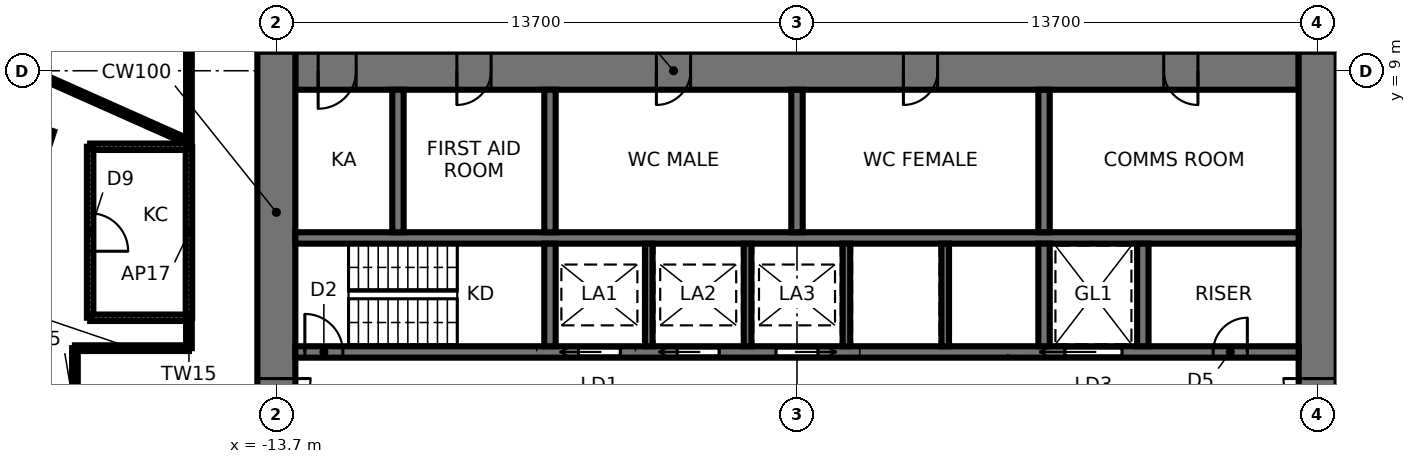
"""IFC4 building model, lengths in metres.
Left out: names, types, materials, properties, quantities, classifications, styles, units other than length and angle.
Written with IfcOpenShell. Run it as: python <this file> out.ifc"""

import sys

from ifc_helpers import new_model, si_unit, direction, frame, frame_2d, origin, origin_2d, place, context, subcontext, project, spatial, rectangle, extrude, element, fill, save


model = new_model("IFC4")
c1 = context("Model", 3, precision=1e-05, world=origin(), true_north=direction((0.0, 1.0)))
c2 = subcontext(c1, "Body", "Model", "MODEL_VIEW")
j1 = project(units=[si_unit("LENGTHUNIT", "METRE"), si_unit("PLANEANGLEUNIT", "RADIAN")], contexts=[c1])
p1 = place(None, origin())
s1 = spatial("IfcSite", under=j1, at=p1, CompositionType="ELEMENT")
p2 = place(p1, origin())
s2 = spatial("IfcBuilding", under=s1, at=p2, CompositionType="ELEMENT")
p3 = place(p2, frame((0.0, 0.0, 32.2)))
s3 = spatial("IfcBuildingStorey", under=s2, at=p3, CompositionType="ELEMENT", Elevation=32.2)
p4 = place(p3, frame((-20.808, 6.761, 0.0), z_axis=(0.0, 0.0, 1.0), x_axis=(-0.951056516295, 0.309016994375, 0.0)))
e1 = element("IfcColumn", 1, at=p4, inside=s3, PredefinedType="COLUMN", context=c2, shape_type="SweptSolid", body=[
    extrude(rectangle(XDim=2.0, YDim=2.0, at=origin_2d()), origin(), (0.0, 0.0, 1.0), 4.2),
])
p5 = place(p3, frame((13.2, 9.0, 0.0), z_axis=(0.0, 0.0, 1.0), x_axis=(-1.0, 0.0, 0.0)))
e2 = element("IfcWall", 2, at=p5, inside=s3, PredefinedType="SHEAR", context=c2, shape_type="SweptSolid", body=[
    extrude(rectangle(XDim=26.4, YDim=1.0, at=frame_2d((13.2, 0.0))), origin(), (0.0, 0.0, 1.0), 4.2),
])
p6 = place(p5, frame((2.65, 0.0, 0.0)))
e3 = element("IfcOpeningElement", 3, at=p6, cuts=e2, PredefinedType="OPENING", context=c2, shape_type="SweptSolid", body=[
    extrude(rectangle(XDim=0.9, YDim=2.1, at=frame_2d((0.45, 1.05))), frame((0.0, 0.51, 0.0), z_axis=(0.0, -1.0, 0.0), x_axis=(1.0, 0.0, 0.0)), (0.0, 0.0, 1.0), 1.02),
])
p7 = place(p5, frame((9.5, 0.0, 0.0)))
e4 = element("IfcOpeningElement", 4, at=p7, cuts=e2, PredefinedType="OPENING", context=c2, shape_type="SweptSolid", body=[
    extrude(rectangle(XDim=0.9, YDim=2.1, at=frame_2d((0.45, 1.05))), frame((0.0, 0.51, 0.0), z_axis=(0.0, -1.0, 0.0), x_axis=(1.0, 0.0, 0.0)), (0.0, 0.0, 1.0), 1.02),
])
p8 = place(p5, frame((16.0, 0.0, 0.0)))
e5 = element("IfcOpeningElement", 5, at=p8, cuts=e2, PredefinedType="OPENING", context=c2, shape_type="SweptSolid", body=[
    extrude(rectangle(XDim=0.9, YDim=2.1, at=frame_2d((0.45, 1.05))), frame((0.0, 0.51, 0.0), z_axis=(0.0, -1.0, 0.0), x_axis=(1.0, 0.0, 0.0)), (0.0, 0.0, 1.0), 1.02),
])
p9 = place(p5, frame((21.25, 0.0, 0.0)))
e6 = element("IfcOpeningElement", 6, at=p9, cuts=e2, PredefinedType="OPENING", context=c2, shape_type="SweptSolid", body=[
    extrude(rectangle(XDim=0.9, YDim=2.1, at=frame_2d((0.45, 1.05))), frame((0.0, 0.51, 0.0), z_axis=(0.0, -1.0, 0.0), x_axis=(1.0, 0.0, 0.0)), (0.0, 0.0, 1.0), 1.02),
])
p10 = place(p5, frame((24.8, 0.0, 0.0)))
e7 = element("IfcOpeningElement", 7, at=p10, cuts=e2, PredefinedType="OPENING", context=c2, shape_type="SweptSolid", body=[
    extrude(rectangle(XDim=1.0, YDim=2.1, at=frame_2d((0.5, 1.05))), frame((0.0, 0.51, 0.0), z_axis=(0.0, -1.0, 0.0), x_axis=(1.0, 0.0, 0.0)), (0.0, 0.0, 1.0), 1.02),
])
p11 = place(p3, frame((13.7, -9.5, 0.0), z_axis=(0.0, 0.0, 1.0), x_axis=(0.0, 1.0, 0.0)))
e8 = element("IfcWall", 8, at=p11, inside=s3, PredefinedType="SHEAR", context=c2, shape_type="SweptSolid", body=[
    extrude(rectangle(XDim=19.0, YDim=1.0, at=frame_2d((9.5, 0.0))), origin(), (0.0, 0.0, 1.0), 4.2),
])
p12 = place(p11, frame((8.6, 0.0, 0.0)))
e9 = element("IfcOpeningElement", 9, at=p12, cuts=e8, PredefinedType="OPENING", context=c2, shape_type="SweptSolid", body=[
    extrude(rectangle(XDim=1.8, YDim=2.4, at=frame_2d((0.9, 1.2))), frame((0.0, 0.51, 0.0), z_axis=(0.0, -1.0, 0.0), x_axis=(1.0, 0.0, 0.0)), (0.0, 0.0, 1.0), 1.02),
])
p13 = place(p3, frame((-13.7, 9.5, 0.0), z_axis=(0.0, 0.0, 1.0), x_axis=(0.0, -1.0, 0.0)))
e10 = element("IfcWall", 10, at=p13, inside=s3, PredefinedType="SHEAR", context=c2, shape_type="SweptSolid", body=[
    extrude(rectangle(XDim=19.0, YDim=1.0, at=frame_2d((9.5, 0.0))), origin(), (0.0, 0.0, 1.0), 4.2),
])
p14 = place(p13, frame((8.6, 0.0, 0.0)))
e11 = element("IfcOpeningElement", 11, at=p14, cuts=e10, PredefinedType="OPENING", context=c2, shape_type="SweptSolid", body=[
    extrude(rectangle(XDim=1.8, YDim=2.4, at=frame_2d((0.9, 1.2))), frame((0.0, 0.51, 0.0), z_axis=(0.0, -1.0, 0.0), x_axis=(1.0, 0.0, 0.0)), (0.0, 0.0, 1.0), 1.02),
])
p15 = place(p3, frame((-13.2, 1.6, 0.0), z_axis=(0.0, 0.0, 1.0), x_axis=(1.0, 0.0, 0.0)))
e12 = element("IfcWall", 12, at=p15, inside=s3, PredefinedType="SHEAR", context=c2, shape_type="SweptSolid", body=[
    extrude(rectangle(XDim=26.4, YDim=0.3, at=frame_2d((13.2, 0.0))), origin(), (0.0, 0.0, 1.0), 4.2),
])
p16 = place(p15, frame((0.25, 0.0, 0.0)))
e13 = element("IfcOpeningElement", 13, at=p16, cuts=e12, PredefinedType="OPENING", context=c2, shape_type="SweptSolid", body=[
    extrude(rectangle(XDim=1.0, YDim=2.1, at=frame_2d((0.5, 1.05))), frame((0.0, 0.16, 0.0), z_axis=(0.0, -1.0, 0.0), x_axis=(1.0, 0.0, 0.0)), (0.0, 0.0, 1.0), 0.32),
])
p17 = place(p15, frame((20.25, 0.0, 0.0)))
e14 = element("IfcOpeningElement", 14, at=p17, cuts=e12, PredefinedType="OPENING", context=c2, shape_type="SweptSolid", body=[
    extrude(rectangle(XDim=1.5, YDim=2.4, at=frame_2d((0.75, 1.2))), frame((0.0, 0.16, 0.0), z_axis=(0.0, -1.0, 0.0), x_axis=(1.0, 0.0, 0.0)), (0.0, 0.0, 1.0), 0.32),
])
p18 = place(p15, frame((7.45, 0.0, 0.0)))
e15 = element("IfcOpeningElement", 15, at=p18, cuts=e12, PredefinedType="OPENING", context=c2, shape_type="SweptSolid", body=[
    extrude(rectangle(XDim=1.1, YDim=2.3, at=frame_2d((0.55, 1.15))), frame((0.0, 0.16, 0.0), z_axis=(0.0, -1.0, 0.0), x_axis=(1.0, 0.0, 0.0)), (0.0, 0.0, 1.0), 0.32),
])
p19 = place(p15, frame((10.05, 0.0, 0.0)))
e16 = element("IfcOpeningElement", 16, at=p19, cuts=e12, PredefinedType="OPENING", context=c2, shape_type="SweptSolid", body=[
    extrude(rectangle(XDim=1.1, YDim=2.3, at=frame_2d((0.55, 1.15))), frame((0.0, 0.16, 0.0), z_axis=(0.0, -1.0, 0.0), x_axis=(1.0, 0.0, 0.0)), (0.0, 0.0, 1.0), 0.32),
])
p20 = place(p15, frame((12.65, 0.0, 0.0)))
e17 = element("IfcOpeningElement", 17, at=p20, cuts=e12, PredefinedType="OPENING", context=c2, shape_type="SweptSolid", body=[
    extrude(rectangle(XDim=1.1, YDim=2.3, at=frame_2d((0.55, 1.15))), frame((0.0, 0.16, 0.0), z_axis=(0.0, -1.0, 0.0), x_axis=(1.0, 0.0, 0.0)), (0.0, 0.0, 1.0), 0.32),
])
p21 = place(p15, frame((24.15, 0.0, 0.0)))
e18 = element("IfcOpeningElement", 18, at=p21, cuts=e12, PredefinedType="OPENING", context=c2, shape_type="SweptSolid", body=[
    extrude(rectangle(XDim=0.9, YDim=2.1, at=frame_2d((0.45, 1.05))), frame((0.0, 0.16, 0.0), z_axis=(0.0, -1.0, 0.0), x_axis=(1.0, 0.0, 0.0)), (0.0, 0.0, 1.0), 0.32),
])
p22 = place(p3, frame((-13.2, 4.6, 0.0), z_axis=(0.0, 0.0, 1.0), x_axis=(1.0, 0.0, 0.0)))
e19 = element("IfcWall", 19, at=p22, inside=s3, PredefinedType="SHEAR", context=c2, shape_type="SweptSolid", body=[
    extrude(rectangle(XDim=26.4, YDim=0.3, at=frame_2d((13.2, 0.0))), origin(), (0.0, 0.0, 1.0), 4.2),
])
p23 = place(p3, frame((-6.5, 1.75, 0.0), z_axis=(0.0, 0.0, 1.0), x_axis=(0.0, 1.0, 0.0)))
e20 = element("IfcWall", 20, at=p23, inside=s3, PredefinedType="SHEAR", context=c2, shape_type="SweptSolid", body=[
    extrude(rectangle(XDim=2.7, YDim=0.3, at=frame_2d((1.35, 0.0))), origin(), (0.0, 0.0, 1.0), 4.2),
])
p24 = place(p3, frame((-6.5, 4.75, 0.0), z_axis=(0.0, 0.0, 1.0), x_axis=(0.0, 1.0, 0.0)))
e21 = element("IfcWall", 21, at=p24, inside=s3, PredefinedType="SHEAR", context=c2, shape_type="SweptSolid", body=[
    extrude(rectangle(XDim=3.75, YDim=0.3, at=frame_2d((1.875, 0.0))), origin(), (0.0, 0.0, 1.0), 4.2),
])
p25 = place(p3, frame((6.5, 1.75, 0.0), z_axis=(0.0, 0.0, 1.0), x_axis=(0.0, 1.0, 0.0)))
e22 = element("IfcWall", 22, at=p25, inside=s3, PredefinedType="SHEAR", context=c2, shape_type="SweptSolid", body=[
    extrude(rectangle(XDim=2.7, YDim=0.3, at=frame_2d((1.35, 0.0))), origin(), (0.0, 0.0, 1.0), 4.2),
])
p26 = place(p3, frame((6.5, 4.75, 0.0), z_axis=(0.0, 0.0, 1.0), x_axis=(0.0, 1.0, 0.0)))
e23 = element("IfcWall", 23, at=p26, inside=s3, PredefinedType="SHEAR", context=c2, shape_type="SweptSolid", body=[
    extrude(rectangle(XDim=3.75, YDim=0.3, at=frame_2d((1.875, 0.0))), origin(), (0.0, 0.0, 1.0), 4.2),
])
for number, where, z_axis, x_axis in (
    (24, (-3.9, 1.75, 0.0), (0.0, 0.0, 1.0), (0.0, 1.0, 0.0)),
    (25, (-1.3, 1.75, 0.0), (0.0, 0.0, 1.0), (0.0, 1.0, 0.0)),
    (26, (1.3, 1.75, 0.0), (0.0, 0.0, 1.0), (0.0, 1.0, 0.0)),
    (27, (3.9, 1.75, 0.0), (0.0, 0.0, 1.0), (0.0, 1.0, 0.0)),
):
    element("IfcWall", number, at=place(p3, frame(where, z_axis=z_axis, x_axis=x_axis)), inside=s3, PredefinedType="SHEAR", context=c2, shape_type="SweptSolid", body=[
        extrude(rectangle(XDim=2.7, YDim=0.2, at=frame_2d((1.35, 0.0))), origin(), (0.0, 0.0, 1.0), 4.2),
    ])
for number, where, z_axis, x_axis in (
    (28, (0.0, 4.75, 0.0), (0.0, 0.0, 1.0), (0.0, 1.0, 0.0)),
    (29, (-10.5, 4.75, 0.0), (0.0, 0.0, 1.0), (0.0, 1.0, 0.0)),
):
    element("IfcWall", number, at=place(p3, frame(where, z_axis=z_axis, x_axis=x_axis)), inside=s3, PredefinedType="SHEAR", context=c2, shape_type="SweptSolid", body=[
        extrude(rectangle(XDim=3.75, YDim=0.3, at=frame_2d((1.875, 0.0))), origin(), (0.0, 0.0, 1.0), 4.2),
    ])
p27 = place(p3, frame((9.1, 1.75, 0.0), z_axis=(0.0, 0.0, 1.0), x_axis=(0.0, 1.0, 0.0)))
e30 = element("IfcWall", 30, at=p27, inside=s3, PredefinedType="SHEAR", context=c2, shape_type="SweptSolid", body=[
    extrude(rectangle(XDim=2.7, YDim=0.3, at=frame_2d((1.35, 0.0))), origin(), (0.0, 0.0, 1.0), 4.2),
])
p28 = place(p3, frame((-16.0, 11.3, 0.0), z_axis=(0.0, 0.0, 1.0), x_axis=(0.0, -1.0, 0.0)))
e31 = element("IfcWall", 31, at=p28, inside=s3, PredefinedType="PARTITIONING", context=c2, shape_type="SweptSolid", body=[
    extrude(rectangle(XDim=4.3, YDim=0.15, at=frame_2d((2.15, 0.0))), origin(), (0.0, 0.0, 1.0), 4.04),
])
p29 = place(p3, frame((-16.0, 7.124, 0.0), z_axis=(0.0, 0.0, 1.0), x_axis=(-0.913550959064, 0.406724286457, 0.0)))
e32 = element("IfcWall", 32, at=p29, inside=s3, PredefinedType="PARTITIONING", context=c2, shape_type="SweptSolid", body=[
    extrude(rectangle(XDim=8.892, YDim=0.15, at=frame_2d((4.446, 0.0))), origin(), (0.0, 0.0, 1.0), 4.04),
])
p30 = place(p3, frame((-16.0, 7.0, 0.0), z_axis=(0.0, 0.0, 1.0), x_axis=(-1.0, 0.0, 0.0)))
e33 = element("IfcWall", 33, at=p30, inside=s3, PredefinedType="PARTITIONING", context=c2, shape_type="SweptSolid", body=[
    extrude(rectangle(XDim=2.6, YDim=0.17, at=frame_2d((1.3, 0.0))), origin(), (0.0, 0.0, 1.0), 4.04),
])
p31 = place(p3, frame((-16.0, 2.5, 0.0), z_axis=(0.0, 0.0, 1.0), x_axis=(0.0, 1.0, 0.0)))
e34 = element("IfcWall", 34, at=p31, inside=s3, PredefinedType="PARTITIONING", context=c2, shape_type="SweptSolid", body=[
    extrude(rectangle(XDim=4.5, YDim=0.17, at=frame_2d((2.25, 0.0))), origin(), (0.0, 0.0, 1.0), 4.04),
])
p32 = place(p3, frame((-18.6, 7.0, 0.0), z_axis=(0.0, 0.0, 1.0), x_axis=(0.0, -1.0, 0.0)))
e35 = element("IfcWall", 35, at=p32, inside=s3, PredefinedType="PARTITIONING", context=c2, shape_type="SweptSolid", body=[
    extrude(rectangle(XDim=4.5, YDim=0.17, at=frame_2d((2.25, 0.0))), origin(), (0.0, 0.0, 1.0), 3.586),
])
p33 = place(p32, frame((1.75, 0.0, 0.0)))
e36 = element("IfcOpeningElement", 36, at=p33, cuts=e35, PredefinedType="OPENING", context=c2, shape_type="SweptSolid", body=[
    extrude(rectangle(XDim=1.0, YDim=2.4, at=frame_2d((0.5, 1.2))), frame((0.0, 0.095, 0.0), z_axis=(0.0, -1.0, 0.0), x_axis=(1.0, 0.0, 0.0)), (0.0, 0.0, 1.0), 0.19),
])
p34 = place(p3, frame((-18.6, 2.5, 0.0), z_axis=(0.0, 0.0, 1.0), x_axis=(1.0, 0.0, 0.0)))
e37 = element("IfcWall", 37, at=p34, inside=s3, PredefinedType="PARTITIONING", context=c2, shape_type="SweptSolid", body=[
    extrude(rectangle(XDim=2.6, YDim=0.17, at=frame_2d((1.3, 0.0))), origin(), (0.0, 0.0, 1.0), 4.04),
])
p35 = place(p3, frame((-16.0, 2.5, 0.0), z_axis=(0.0, 0.0, 1.0), x_axis=(0.0, -1.0, 0.0)))
e38 = element("IfcWall", 38, at=p35, inside=s3, PredefinedType="PARTITIONING", context=c2, shape_type="SweptSolid", body=[
    extrude(rectangle(XDim=0.8, YDim=0.15, at=frame_2d((0.4, 0.0))), origin(), (0.0, 0.0, 1.0), 4.04),
])
p36 = place(p3, frame((-16.0, 1.7, 0.0), z_axis=(0.0, 0.0, 1.0), x_axis=(-1.0, 0.0, 0.0)))
e39 = element("IfcWall", 39, at=p36, inside=s3, PredefinedType="PARTITIONING", context=c2, shape_type="SweptSolid", body=[
    extrude(rectangle(XDim=3.0, YDim=0.15, at=frame_2d((1.5, 0.0))), origin(), (0.0, 0.0, 1.0), 4.04),
])
p37 = place(p3, frame((-19.0, 1.7, 0.0), z_axis=(0.0, 0.0, 1.0), x_axis=(0.0, -1.0, 0.0)))
e40 = element("IfcWall", 40, at=p37, inside=s3, PredefinedType="PARTITIONING", context=c2, shape_type="SweptSolid", body=[
    extrude(rectangle(XDim=3.4, YDim=0.15, at=frame_2d((1.7, 0.0))), origin(), (0.0, 0.0, 1.0), 3.586),
])
p38 = place(p14, origin())
e41 = element("IfcDoor", 41, at=p38, inside=s3, OperationType="DOUBLE_DOOR_SINGLE_SWING", PredefinedType="DOOR", context=c2, shape_type="SweptSolid", body=[
    extrude(rectangle(XDim=1.72, YDim=2.36, at=frame_2d((0.9, 1.18))), frame((0.0, 0.025, 0.0), z_axis=(0.0, -1.0, 0.0), x_axis=(1.0, 0.0, 0.0)), (0.0, 0.0, 1.0), 0.05),
    extrude(rectangle(XDim=0.04, YDim=2.4, at=frame_2d((0.02, 1.2))), frame((0.0, 0.25, 0.0), z_axis=(0.0, -1.0, 0.0), x_axis=(1.0, 0.0, 0.0)), (0.0, 0.0, 1.0), 0.5),
    extrude(rectangle(XDim=0.04, YDim=2.4, at=frame_2d((1.78, 1.2))), frame((0.0, 0.25, 0.0), z_axis=(0.0, -1.0, 0.0), x_axis=(1.0, 0.0, 0.0)), (0.0, 0.0, 1.0), 0.5),
    extrude(rectangle(XDim=1.72, YDim=0.04, at=frame_2d((0.9, 2.38))), frame((0.0, 0.25, 0.0), z_axis=(0.0, -1.0, 0.0), x_axis=(1.0, 0.0, 0.0)), (0.0, 0.0, 1.0), 0.5),
])
fill(e11, e41)
p39 = place(p12, origin())
e42 = element("IfcDoor", 42, at=p39, inside=s3, OperationType="DOUBLE_DOOR_SINGLE_SWING", PredefinedType="DOOR", context=c2, shape_type="SweptSolid", body=[
    extrude(rectangle(XDim=1.72, YDim=2.36, at=frame_2d((0.9, 1.18))), frame((0.0, 0.025, 0.0), z_axis=(0.0, -1.0, 0.0), x_axis=(1.0, 0.0, 0.0)), (0.0, 0.0, 1.0), 0.05),
    extrude(rectangle(XDim=0.04, YDim=2.4, at=frame_2d((0.02, 1.2))), frame((0.0, 0.25, 0.0), z_axis=(0.0, -1.0, 0.0), x_axis=(1.0, 0.0, 0.0)), (0.0, 0.0, 1.0), 0.5),
    extrude(rectangle(XDim=0.04, YDim=2.4, at=frame_2d((1.78, 1.2))), frame((0.0, 0.25, 0.0), z_axis=(0.0, -1.0, 0.0), x_axis=(1.0, 0.0, 0.0)), (0.0, 0.0, 1.0), 0.5),
    extrude(rectangle(XDim=1.72, YDim=0.04, at=frame_2d((0.9, 2.38))), frame((0.0, 0.25, 0.0), z_axis=(0.0, -1.0, 0.0), x_axis=(1.0, 0.0, 0.0)), (0.0, 0.0, 1.0), 0.5),
])
fill(e9, e42)
p40 = place(p16, origin())
e43 = element("IfcDoor", 43, at=p40, inside=s3, OperationType="SINGLE_SWING_LEFT", PredefinedType="DOOR", context=c2, shape_type="SweptSolid", body=[
    extrude(rectangle(XDim=1.0, YDim=2.1, at=frame_2d((0.5, 1.05))), frame((0.0, 0.025, 0.0), z_axis=(0.0, -1.0, 0.0), x_axis=(1.0, 0.0, 0.0)), (0.0, 0.0, 1.0), 0.05),
])
fill(e13, e43)
p41 = place(p17, origin())
e44 = element("IfcDoor", 44, at=p41, inside=s3, OperationType="SLIDING_TO_LEFT", PredefinedType="DOOR", context=c2, shape_type="SweptSolid", body=[
    extrude(rectangle(XDim=1.5, YDim=2.4, at=frame_2d((0.75, 1.2))), frame((0.0, 0.025, 0.0), z_axis=(0.0, -1.0, 0.0), x_axis=(1.0, 0.0, 0.0)), (0.0, 0.0, 1.0), 0.05),
])
fill(e14, e44)
p42 = place(p18, origin())
e45 = element("IfcDoor", 45, at=p42, inside=s3, OperationType="SLIDING_TO_LEFT", PredefinedType="DOOR", context=c2, shape_type="SweptSolid", body=[
    extrude(rectangle(XDim=1.1, YDim=2.3, at=frame_2d((0.55, 1.15))), frame((0.0, 0.025, 0.0), z_axis=(0.0, -1.0, 0.0), x_axis=(1.0, 0.0, 0.0)), (0.0, 0.0, 1.0), 0.05),
])
fill(e15, e45)
p43 = place(p19, origin())
e46 = element("IfcDoor", 46, at=p43, inside=s3, OperationType="SLIDING_TO_LEFT", PredefinedType="DOOR", context=c2, shape_type="SweptSolid", body=[
    extrude(rectangle(XDim=1.1, YDim=2.3, at=frame_2d((0.55, 1.15))), frame((0.0, 0.025, 0.0), z_axis=(0.0, -1.0, 0.0), x_axis=(1.0, 0.0, 0.0)), (0.0, 0.0, 1.0), 0.05),
])
fill(e16, e46)
p44 = place(p20, origin())
e47 = element("IfcDoor", 47, at=p44, inside=s3, OperationType="SLIDING_TO_RIGHT", PredefinedType="DOOR", context=c2, shape_type="SweptSolid", body=[
    extrude(rectangle(XDim=1.1, YDim=2.3, at=frame_2d((0.55, 1.15))), frame((0.0, 0.025, 0.0), z_axis=(0.0, -1.0, 0.0), x_axis=(1.0, 0.0, 0.0)), (0.0, 0.0, 1.0), 0.05),
])
fill(e17, e47)
p45 = place(p21, origin())
e48 = element("IfcDoor", 48, at=p45, inside=s3, OperationType="SINGLE_SWING_RIGHT", PredefinedType="DOOR", context=c2, shape_type="SweptSolid", body=[
    extrude(rectangle(XDim=0.9, YDim=2.1, at=frame_2d((0.45, 1.05))), frame((0.0, 0.025, 0.0), z_axis=(0.0, -1.0, 0.0), x_axis=(1.0, 0.0, 0.0)), (0.0, 0.0, 1.0), 0.05),
])
fill(e18, e48)
p46 = place(p6, origin())
e49 = element("IfcDoor", 49, at=p46, inside=s3, OperationType="SINGLE_SWING_LEFT", PredefinedType="DOOR", context=c2, shape_type="SweptSolid", body=[
    extrude(rectangle(XDim=0.82, YDim=2.06, at=frame_2d((0.45, 1.03))), frame((0.0, 0.025, 0.0), z_axis=(0.0, -1.0, 0.0), x_axis=(1.0, 0.0, 0.0)), (0.0, 0.0, 1.0), 0.05),
    extrude(rectangle(XDim=0.04, YDim=2.1, at=frame_2d((0.02, 1.05))), frame((0.0, 0.25, 0.0), z_axis=(0.0, -1.0, 0.0), x_axis=(1.0, 0.0, 0.0)), (0.0, 0.0, 1.0), 0.5),
    extrude(rectangle(XDim=0.04, YDim=2.1, at=frame_2d((0.88, 1.05))), frame((0.0, 0.25, 0.0), z_axis=(0.0, -1.0, 0.0), x_axis=(1.0, 0.0, 0.0)), (0.0, 0.0, 1.0), 0.5),
    extrude(rectangle(XDim=0.82, YDim=0.04, at=frame_2d((0.45, 2.08))), frame((0.0, 0.25, 0.0), z_axis=(0.0, -1.0, 0.0), x_axis=(1.0, 0.0, 0.0)), (0.0, 0.0, 1.0), 0.5),
])
fill(e3, e49)
p47 = place(p7, origin())
e50 = element("IfcDoor", 50, at=p47, inside=s3, OperationType="SINGLE_SWING_RIGHT", PredefinedType="DOOR", context=c2, shape_type="SweptSolid", body=[
    extrude(rectangle(XDim=0.82, YDim=2.06, at=frame_2d((0.45, 1.03))), frame((0.0, 0.025, 0.0), z_axis=(0.0, -1.0, 0.0), x_axis=(1.0, 0.0, 0.0)), (0.0, 0.0, 1.0), 0.05),
    extrude(rectangle(XDim=0.04, YDim=2.1, at=frame_2d((0.02, 1.05))), frame((0.0, 0.25, 0.0), z_axis=(0.0, -1.0, 0.0), x_axis=(1.0, 0.0, 0.0)), (0.0, 0.0, 1.0), 0.5),
    extrude(rectangle(XDim=0.04, YDim=2.1, at=frame_2d((0.88, 1.05))), frame((0.0, 0.25, 0.0), z_axis=(0.0, -1.0, 0.0), x_axis=(1.0, 0.0, 0.0)), (0.0, 0.0, 1.0), 0.5),
    extrude(rectangle(XDim=0.82, YDim=0.04, at=frame_2d((0.45, 2.08))), frame((0.0, 0.25, 0.0), z_axis=(0.0, -1.0, 0.0), x_axis=(1.0, 0.0, 0.0)), (0.0, 0.0, 1.0), 0.5),
])
fill(e4, e50)
p48 = place(p8, origin())
e51 = element("IfcDoor", 51, at=p48, inside=s3, OperationType="SINGLE_SWING_RIGHT", PredefinedType="DOOR", context=c2, shape_type="SweptSolid", body=[
    extrude(rectangle(XDim=0.82, YDim=2.06, at=frame_2d((0.45, 1.03))), frame((0.0, 0.025, 0.0), z_axis=(0.0, -1.0, 0.0), x_axis=(1.0, 0.0, 0.0)), (0.0, 0.0, 1.0), 0.05),
    extrude(rectangle(XDim=0.04, YDim=2.1, at=frame_2d((0.02, 1.05))), frame((0.0, 0.25, 0.0), z_axis=(0.0, -1.0, 0.0), x_axis=(1.0, 0.0, 0.0)), (0.0, 0.0, 1.0), 0.5),
    extrude(rectangle(XDim=0.04, YDim=2.1, at=frame_2d((0.88, 1.05))), frame((0.0, 0.25, 0.0), z_axis=(0.0, -1.0, 0.0), x_axis=(1.0, 0.0, 0.0)), (0.0, 0.0, 1.0), 0.5),
    extrude(rectangle(XDim=0.82, YDim=0.04, at=frame_2d((0.45, 2.08))), frame((0.0, 0.25, 0.0), z_axis=(0.0, -1.0, 0.0), x_axis=(1.0, 0.0, 0.0)), (0.0, 0.0, 1.0), 0.5),
])
fill(e5, e51)
p49 = place(p9, origin())
e52 = element("IfcDoor", 52, at=p49, inside=s3, OperationType="SINGLE_SWING_RIGHT", PredefinedType="DOOR", context=c2, shape_type="SweptSolid", body=[
    extrude(rectangle(XDim=0.82, YDim=2.06, at=frame_2d((0.45, 1.03))), frame((0.0, 0.025, 0.0), z_axis=(0.0, -1.0, 0.0), x_axis=(1.0, 0.0, 0.0)), (0.0, 0.0, 1.0), 0.05),
    extrude(rectangle(XDim=0.04, YDim=2.1, at=frame_2d((0.02, 1.05))), frame((0.0, 0.25, 0.0), z_axis=(0.0, -1.0, 0.0), x_axis=(1.0, 0.0, 0.0)), (0.0, 0.0, 1.0), 0.5),
    extrude(rectangle(XDim=0.04, YDim=2.1, at=frame_2d((0.88, 1.05))), frame((0.0, 0.25, 0.0), z_axis=(0.0, -1.0, 0.0), x_axis=(1.0, 0.0, 0.0)), (0.0, 0.0, 1.0), 0.5),
    extrude(rectangle(XDim=0.82, YDim=0.04, at=frame_2d((0.45, 2.08))), frame((0.0, 0.25, 0.0), z_axis=(0.0, -1.0, 0.0), x_axis=(1.0, 0.0, 0.0)), (0.0, 0.0, 1.0), 0.5),
])
fill(e6, e52)
p50 = place(p10, origin())
e53 = element("IfcDoor", 53, at=p50, inside=s3, OperationType="SINGLE_SWING_RIGHT", PredefinedType="DOOR", context=c2, shape_type="SweptSolid", body=[
    extrude(rectangle(XDim=0.92, YDim=2.06, at=frame_2d((0.5, 1.03))), frame((0.0, 0.025, 0.0), z_axis=(0.0, -1.0, 0.0), x_axis=(1.0, 0.0, 0.0)), (0.0, 0.0, 1.0), 0.05),
    extrude(rectangle(XDim=0.04, YDim=2.1, at=frame_2d((0.02, 1.05))), frame((0.0, 0.25, 0.0), z_axis=(0.0, -1.0, 0.0), x_axis=(1.0, 0.0, 0.0)), (0.0, 0.0, 1.0), 0.5),
    extrude(rectangle(XDim=0.04, YDim=2.1, at=frame_2d((0.98, 1.05))), frame((0.0, 0.25, 0.0), z_axis=(0.0, -1.0, 0.0), x_axis=(1.0, 0.0, 0.0)), (0.0, 0.0, 1.0), 0.5),
    extrude(rectangle(XDim=0.92, YDim=0.04, at=frame_2d((0.5, 2.08))), frame((0.0, 0.25, 0.0), z_axis=(0.0, -1.0, 0.0), x_axis=(1.0, 0.0, 0.0)), (0.0, 0.0, 1.0), 0.5),
])
fill(e7, e53)
p51 = place(p33, origin())
e54 = element("IfcDoor", 54, at=p51, inside=s3, OperationType="SINGLE_SWING_RIGHT", PredefinedType="DOOR", context=c2, shape_type="SweptSolid", body=[
    extrude(rectangle(XDim=1.0, YDim=2.4, at=frame_2d((0.5, 1.2))), frame((0.0, 0.025, 0.0), z_axis=(0.0, -1.0, 0.0), x_axis=(1.0, 0.0, 0.0)), (0.0, 0.0, 1.0), 0.05),
])
fill(e36, e54)
save(model, sys.argv[1])
